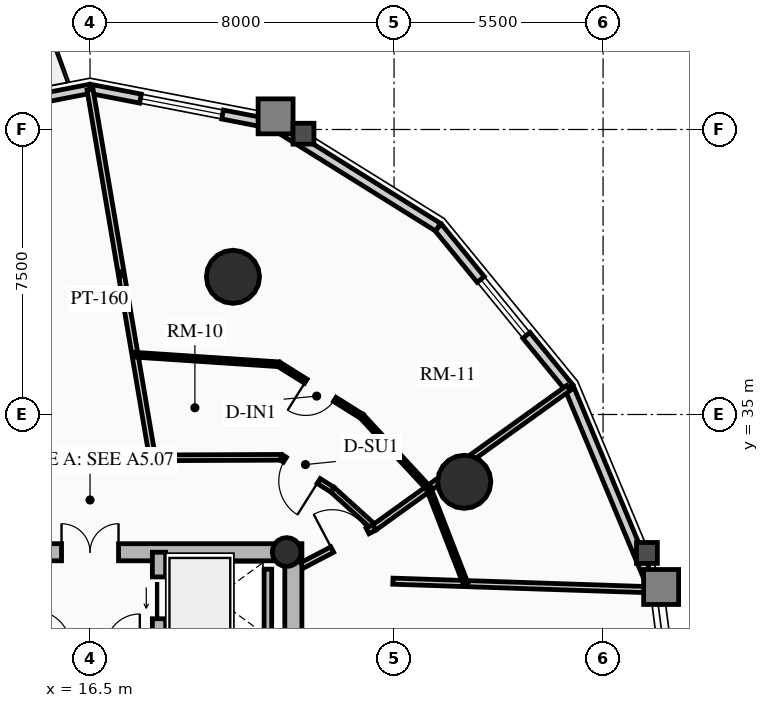
"""IFC4 building model, lengths in metres.
Left out: names, types, materials, properties, quantities, classifications, styles, units other than length and angle.
Written with IfcOpenShell. Run it as: python <this file> out.ifc"""

import sys

from ifc_helpers import new_model, si_unit, direction, frame, frame_2d, origin, origin_2d, place, context, subcontext, project, spatial, rectangle, circle, hollow_circle, extrude, source, transform, mapped, element, fill, save


model = new_model("IFC4")
c1 = context("Model", 3, precision=1e-05, world=origin(), true_north=direction((0.0, 1.0)))
c2 = subcontext(c1, "Body", "Model", "MODEL_VIEW")
j1 = project(units=[si_unit("LENGTHUNIT", "METRE"), si_unit("PLANEANGLEUNIT", "RADIAN")], contexts=[c1])
p1 = place(None, origin())
s1 = spatial("IfcSite", under=j1, at=p1, CompositionType="ELEMENT")
p2 = place(p1, origin())
s2 = spatial("IfcBuilding", under=s1, at=p2, CompositionType="ELEMENT")
p3 = place(p2, frame((0.0, 0.0, 110.89)))
s3 = spatial("IfcBuildingStorey", under=s2, at=p3, CompositionType="ELEMENT", Elevation=110.89)
p4 = place(p3, frame((21.85, 17.4, 0.0), z_axis=(0.0, 0.0, 1.0), x_axis=(0.0, 1.0, 0.0)))
e1 = element("IfcWall", 1, at=p4, inside=s3, PredefinedType="SHEAR", context=c2, shape_type="SweptSolid", body=[
    extrude(rectangle(XDim=14.2, YDim=0.45, at=frame_2d((7.1, 0.0))), origin(), (0.0, 0.0, 1.0), 2.91),
])
p5 = place(p3, frame((11.15, 31.375, 0.0), z_axis=(0.0, 0.0, 1.0), x_axis=(1.0, 0.0, 0.0)))
e2 = element("IfcWall", 2, at=p5, inside=s3, PredefinedType="SHEAR", context=c2, shape_type="SweptSolid", body=[
    extrude(rectangle(XDim=10.7, YDim=0.45, at=frame_2d((5.35, 0.0))), origin(), (0.0, 0.0, 1.0), 2.91),
])
m1 = source(origin(), c2, "Body", "SweptSolid", [
    extrude(rectangle(XDim=1.5, YDim=2.02, at=frame_2d((0.75, 1.01))), frame((0.0, 0.235, 0.0), z_axis=(0.0, -1.0, 0.0), x_axis=(1.0, 0.0, 0.0)), (0.0, 0.0, 1.0), 0.47),
])
p6 = place(p5, frame((4.6, 0.0, 0.0)))
e3 = element("IfcOpeningElement", 3, at=p6, cuts=e2, PredefinedType="OPENING", context=c2, shape_type="MappedRepresentation", body=[
    mapped(m1, transform((0.0, 0.0, 0.0), x_axis=(1.0, 0.0, 0.0), y_axis=(0.0, 1.0, 0.0), z_axis=(0.0, 0.0, 1.0), scale=1.0)),
])
p7 = place(p3, frame((18.315, 17.625, 0.0), z_axis=(0.0, 0.0, 1.0), x_axis=(0.0, 1.0, 0.0)))
e4 = element("IfcWall", 4, at=p7, inside=s3, PredefinedType="SHEAR", context=c2, shape_type="SweptSolid", body=[
    extrude(rectangle(XDim=13.75, YDim=0.35, at=frame_2d((6.875, 0.0))), origin(), (0.0, 0.0, 1.0), 2.91),
])
m2 = source(origin(), c2, "Body", "SweptSolid", [
    extrude(rectangle(XDim=1.1, YDim=2.015, at=frame_2d((0.55, 1.007))), frame((0.0, 0.185, 0.0), z_axis=(0.0, -1.0, 0.0), x_axis=(1.0, 0.0, 0.0)), (0.0, 0.0, 1.0), 0.37),
])
p8 = place(p7, frame((10.0, 0.0, 0.0)))
e5 = element("IfcOpeningElement", 5, at=p8, cuts=e4, PredefinedType="OPENING", context=c2, shape_type="MappedRepresentation", body=[
    mapped(m2, transform((0.0, 0.0, 0.0), x_axis=(1.0, 0.0, 0.0), y_axis=(0.0, 1.0, 0.0), z_axis=(0.0, 0.0, 1.0), scale=1.0)),
])
p9 = place(p7, frame((12.0, 0.0, 0.0)))
e6 = element("IfcOpeningElement", 6, at=p9, cuts=e4, PredefinedType="OPENING", context=c2, shape_type="MappedRepresentation", body=[
    mapped(m2, transform((0.0, 0.0, 0.0), x_axis=(1.0, 0.0, 0.0), y_axis=(0.0, 1.0, 0.0), z_axis=(0.0, 0.0, 1.0), scale=1.0)),
])
m3 = source(origin(), c2, "Body", "SweptSolid", [
    extrude(rectangle(XDim=1.15, YDim=2.02, at=frame_2d((0.575, 1.01))), frame((0.0, 0.185, 0.0), z_axis=(0.0, -1.0, 0.0), x_axis=(1.0, 0.0, 0.0)), (0.0, 0.0, 1.0), 0.37),
])
p10 = place(p7, frame((5.305, 0.0, 0.0)))
e7 = element("IfcOpeningElement", 7, at=p10, cuts=e4, PredefinedType="OPENING", context=c2, shape_type="MappedRepresentation", body=[
    mapped(m3, transform((0.0, 0.0, 0.0), x_axis=(1.0, 0.0, 0.0), y_axis=(0.0, 1.0, 0.0), z_axis=(0.0, 0.0, 1.0), scale=1.0)),
])
p11 = place(p3, frame((21.675, 31.38, 0.0), z_axis=(0.0, 0.0, 1.0), x_axis=(1.0, 0.0, 0.0)))
e8 = element("IfcColumn", 8, at=p11, inside=s3, PredefinedType="COLUMN", context=c2, shape_type="SweptSolid", body=[
    extrude(hollow_circle(Radius=0.38, WallThickness=0.032, at=origin_2d()), origin(), (0.0, 0.0, 1.0), 2.91),
])
for number, where, z_axis, x_axis in (
    (9, (26.347, 33.229, 0.0), (0.0, 0.0, 1.0), (1.0, 0.0, 0.0)),
    (10, (20.261, 38.623, 0.0), (0.0, 0.0, 1.0), (1.0, 0.0, 0.0)),
):
    element("IfcColumn", number, at=place(p3, frame(where, z_axis=z_axis, x_axis=x_axis)), inside=s3, PredefinedType="USERDEFINED", context=c2, shape_type="SweptSolid", body=[
        extrude(circle(Radius=0.7, at=origin_2d()), origin(), (0.0, 0.0, 1.0), 2.91),
    ])
p12 = place(p3, frame((29.105, 35.709, 0.0), z_axis=(0.0, 0.0, 1.0), x_axis=(0.384344417632, -0.923189779317, 0.0)))
e11 = element("IfcWall", 11, at=p12, inside=s3, PredefinedType="SOLIDWALL", context=c2, shape_type="SweptSolid", body=[
    extrude(rectangle(XDim=5.758, YDim=0.24, at=frame_2d((2.879, 0.0))), origin(), (0.0, 0.0, 1.0), 2.179),
])
p13 = place(p3, frame((25.658, 39.928, 0.0), z_axis=(0.0, 0.0, 1.0), x_axis=(0.632700781152, -0.77439635945, 0.0)))
e12 = element("IfcWall", 12, at=p13, inside=s3, PredefinedType="SOLIDWALL", context=c2, shape_type="SweptSolid", body=[
    extrude(rectangle(XDim=5.448, YDim=0.24, at=frame_2d((2.724, 0.0))), origin(), (0.0, 0.0, 1.0), 2.179),
])
m4 = source(origin(), c2, "Body", "SweptSolid", [
    extrude(rectangle(XDim=1.9, YDim=1.35, at=frame_2d((0.95, 0.675))), frame((0.0, 0.13, 0.0), z_axis=(0.0, -1.0, 0.0), x_axis=(1.0, 0.0, 0.0)), (0.0, 0.0, 1.0), 0.26),
])
p14 = place(p13, frame((1.774, 0.0, 0.65)))
e13 = element("IfcOpeningElement", 13, at=p14, cuts=e12, PredefinedType="OPENING", context=c2, shape_type="MappedRepresentation", body=[
    mapped(m4, transform((0.0, 0.0, 0.0), x_axis=(1.0, 0.0, 0.0), y_axis=(0.0, 1.0, 0.0), z_axis=(0.0, 0.0, 1.0), scale=1.0)),
])
p15 = place(p3, frame((21.315, 42.637, 0.0), z_axis=(0.0, 0.0, 1.0), x_axis=(0.848520380187, -0.529162701263, 0.0)))
e14 = element("IfcWall", 14, at=p15, inside=s3, PredefinedType="SOLIDWALL", context=c2, shape_type="SweptSolid", body=[
    extrude(rectangle(XDim=5.119, YDim=0.24, at=frame_2d((2.56, 0.0))), origin(), (0.0, 0.0, 1.0), 2.179),
])
p16 = place(p3, frame((16.5, 43.57, 0.0), z_axis=(0.0, 0.0, 1.0), x_axis=(0.981723785992, -0.190311344954, 0.0)))
e15 = element("IfcWall", 15, at=p16, inside=s3, PredefinedType="SOLIDWALL", context=c2, shape_type="SweptSolid", body=[
    extrude(rectangle(XDim=4.904, YDim=0.24, at=frame_2d((2.452, 0.0))), origin(), (0.0, 0.0, 1.0), 2.179),
])
m5 = source(origin(), c2, "Body", "SweptSolid", [
    extrude(rectangle(XDim=2.2, YDim=1.35, at=frame_2d((1.1, 0.675))), frame((0.0, 0.13, 0.0), z_axis=(0.0, -1.0, 0.0), x_axis=(1.0, 0.0, 0.0)), (0.0, 0.0, 1.0), 0.26),
])
p17 = place(p16, frame((1.352, 0.0, 0.65)))
e16 = element("IfcOpeningElement", 16, at=p17, cuts=e15, PredefinedType="OPENING", context=c2, shape_type="MappedRepresentation", body=[
    mapped(m5, transform((0.0, 0.0, 0.0), x_axis=(1.0, 0.0, 0.0), y_axis=(0.0, 1.0, 0.0), z_axis=(0.0, 0.0, 1.0), scale=1.0)),
])
p18 = place(p3, frame((11.685, 42.637, 0.0), z_axis=(0.0, 0.0, 1.0), x_axis=(0.981723785992, 0.190311344954, 0.0)))
e17 = element("IfcWall", 17, at=p18, inside=s3, PredefinedType="SOLIDWALL", context=c2, shape_type="SweptSolid", body=[
    extrude(rectangle(XDim=4.904, YDim=0.24, at=frame_2d((2.452, 0.0))), origin(), (0.0, 0.0, 1.0), 2.179),
])
m6 = source(origin(), c2, "Body", "SweptSolid", [
    extrude(rectangle(XDim=1.15, YDim=2.005, at=frame_2d((0.575, 1.002))), frame((0.0, 0.13, 0.0), z_axis=(0.0, -1.0, 0.0), x_axis=(1.0, 0.0, 0.0)), (0.0, 0.0, 1.0), 0.26),
])
p19 = place(p18, frame((1.877, 0.0, 0.0)))
e18 = element("IfcOpeningElement", 18, at=p19, cuts=e17, PredefinedType="OPENING", context=c2, shape_type="MappedRepresentation", body=[
    mapped(m6, transform((0.0, 0.0, 0.0), x_axis=(1.0, 0.0, 0.0), y_axis=(0.0, 1.0, 0.0), z_axis=(0.0, 0.0, 1.0), scale=1.0)),
])
p20 = place(p3, frame((21.18, 29.295, 0.0), z_axis=(0.0, 0.0, 1.0), x_axis=(0.0, 1.0, 0.0)))
e19 = element("IfcWall", 19, at=p20, inside=s3, PredefinedType="SHEAR", context=c2, shape_type="SweptSolid", body=[
    extrude(rectangle(XDim=1.635, YDim=0.2, at=frame_2d((0.817, 0.0))), origin(), (0.0, 0.0, 1.0), 2.91),
])
p21 = place(p3, frame((23.98, 32.027, 0.0), z_axis=(0.0, 0.0, 1.0), x_axis=(-0.742353224332, 0.670008724065, 0.0)))
e20 = element("IfcWall", 20, at=p21, inside=s3, PredefinedType="PARTITIONING", context=c2, shape_type="SweptSolid", body=[
    extrude(rectangle(XDim=1.485, YDim=0.15, at=frame_2d((0.742, 0.0))), origin(), (0.0, 0.0, 1.0), 2.225),
])
p22 = place(p3, frame((22.877, 33.022, 0.0), z_axis=(0.0, 0.0, 1.0), x_axis=(-0.845895608855, 0.533348496689, 0.0)))
e21 = element("IfcWall", 21, at=p22, inside=s3, PredefinedType="PARTITIONING", context=c2, shape_type="SweptSolid", body=[
    extrude(rectangle(XDim=1.597, YDim=0.15, at=frame_2d((0.798, 0.0))), origin(), (0.0, 0.0, 1.0), 2.225),
])
m7 = source(origin(), c2, "Body", "SweptSolid", [
    extrude(rectangle(XDim=1.05, YDim=2.015, at=frame_2d((0.525, 1.007))), frame((0.0, 0.085, 0.0), z_axis=(0.0, -1.0, 0.0), x_axis=(1.0, 0.0, 0.0)), (0.0, 0.0, 1.0), 0.17),
])
p23 = place(p22, frame((0.427, 0.0, 0.0)))
e22 = element("IfcOpeningElement", 22, at=p23, cuts=e21, PredefinedType="OPENING", context=c2, shape_type="MappedRepresentation", body=[
    mapped(m7, transform((0.0, 0.0, 0.0), x_axis=(1.0, 0.0, 0.0), y_axis=(0.0, 1.0, 0.0), z_axis=(0.0, 0.0, 1.0), scale=1.0)),
])
p24 = place(p3, frame((21.527, 33.873, 0.0), z_axis=(0.0, 0.0, 1.0), x_axis=(-0.999991838845, -0.004040079574, 0.0)))
e23 = element("IfcWall", 23, at=p24, inside=s3, PredefinedType="PARTITIONING", context=c2, shape_type="SweptSolid", body=[
    extrude(rectangle(XDim=3.384, YDim=0.15, at=frame_2d((1.692, 0.0))), origin(), (0.0, 0.0, 1.0), 2.225),
])
p25 = place(p3, frame((18.143, 33.86, 0.0), z_axis=(0.0, 0.0, 1.0), x_axis=(-0.999419208319, -0.034077060363, 0.0)))
e24 = element("IfcWall", 24, at=p25, inside=s3, PredefinedType="PARTITIONING", context=c2, shape_type="SweptSolid", body=[
    extrude(rectangle(XDim=6.527, YDim=0.15, at=frame_2d((3.263, 0.0))), origin(), (0.0, 0.0, 1.0), 2.225),
])
p26 = place(p3, frame((24.469, 30.614, 0.0), z_axis=(0.0, 0.0, 1.0), x_axis=(0.999446768925, -0.033258924898, 0.0)))
e25 = element("IfcWall", 25, at=p26, inside=s3, PredefinedType="PARTITIONING", context=c2, shape_type="SweptSolid", body=[
    extrude(rectangle(XDim=6.834, YDim=0.16, at=frame_2d((3.417, 0.0))), origin(), (0.0, 0.0, 1.0), 2.179),
])
p27 = place(p3, frame((23.98, 32.027, 0.0), z_axis=(0.0, 0.0, 1.0), x_axis=(0.812162479031, 0.58343132214, 0.0)))
e26 = element("IfcWall", 26, at=p27, inside=s3, PredefinedType="PARTITIONING", context=c2, shape_type="SweptSolid", body=[
    extrude(rectangle(XDim=6.291, YDim=0.16, at=frame_2d((3.146, 0.0))), origin(), (0.0, 0.0, 1.0), 2.179),
])
p28 = place(p3, frame((18.143, 33.86, 0.0), z_axis=(0.0, 0.0, 1.0), x_axis=(-0.167145472003, 0.985932244725, 0.0)))
e27 = element("IfcWall", 27, at=p28, inside=s3, PredefinedType="PARTITIONING", context=c2, shape_type="SweptSolid", body=[
    extrude(rectangle(XDim=9.829, YDim=0.16, at=frame_2d((4.914, 0.0))), origin(), (0.0, 0.0, 1.0), 2.179),
])
p29 = place(p3, frame((22.075, 31.025, 0.0), z_axis=(0.0, 0.0, 1.0), x_axis=(0.885026466958, 0.465540710125, 0.0)))
e28 = element("IfcWall", 28, at=p29, inside=s3, PredefinedType="PARTITIONING", context=c2, shape_type="SweptSolid", body=[
    extrude(rectangle(XDim=2.152, YDim=0.16, at=frame_2d((1.076, 0.0))), origin(), (0.0, 0.0, 1.0), 2.225),
])
m8 = source(origin(), c2, "Body", "SweptSolid", [
    extrude(rectangle(XDim=1.05, YDim=2.015, at=frame_2d((0.525, 1.007))), frame((0.0, 0.09, 0.0), z_axis=(0.0, -1.0, 0.0), x_axis=(1.0, 0.0, 0.0)), (0.0, 0.0, 1.0), 0.18),
])
p30 = place(p29, frame((0.902, 0.0, 0.0)))
e29 = element("IfcOpeningElement", 29, at=p30, cuts=e28, PredefinedType="OPENING", context=c2, shape_type="MappedRepresentation", body=[
    mapped(m8, transform((0.0, 0.0, 0.0), x_axis=(1.0, 0.0, 0.0), y_axis=(0.0, 1.0, 0.0), z_axis=(0.0, 0.0, 1.0), scale=1.0)),
])
p31 = place(p3, frame((26.382, 30.551, 0.0), z_axis=(0.0, 0.0, 1.0), x_axis=(-0.361621391028, 0.932325034283, 0.0)))
e30 = element("IfcWall", 30, at=p31, inside=s3, PredefinedType="PARTITIONING", context=c2, shape_type="SweptSolid", body=[
    extrude(rectangle(XDim=2.686, YDim=0.125, at=frame_2d((1.343, 0.0))), origin(), (0.0, 0.0, 1.0), 2.225),
])
p32 = place(p3, frame((25.41, 33.054, 0.0), z_axis=(0.0, 0.0, 1.0), x_axis=(-0.679733694606, 0.73345899982, 0.0)))
e31 = element("IfcWall", 31, at=p32, inside=s3, PredefinedType="PARTITIONING", context=c2, shape_type="SweptSolid", body=[
    extrude(rectangle(XDim=2.586, YDim=0.125, at=frame_2d((1.293, 0.0))), origin(), (0.0, 0.0, 1.0), 2.655),
])
p33 = place(p3, frame((23.653, 34.951, 0.0), z_axis=(0.0, 0.0, 1.0), x_axis=(-0.847306782665, 0.531103771452, 0.0)))
e32 = element("IfcWall", 32, at=p33, inside=s3, PredefinedType="PARTITIONING", context=c2, shape_type="SweptSolid", body=[
    extrude(rectangle(XDim=2.581, YDim=0.125, at=frame_2d((1.291, 0.0))), origin(), (0.0, 0.0, 1.0), 2.225),
])
m9 = source(origin(), c2, "Body", "SweptSolid", [
    extrude(rectangle(XDim=0.9, YDim=2.005, at=frame_2d((0.45, 1.002))), frame((0.0, 0.073, 0.0), z_axis=(0.0, -1.0, 0.0), x_axis=(1.0, 0.0, 0.0)), (0.0, 0.0, 1.0), 0.145),
])
p34 = place(p33, frame((0.841, 0.0, 0.0)))
e33 = element("IfcOpeningElement", 33, at=p34, cuts=e32, PredefinedType="OPENING", context=c2, shape_type="MappedRepresentation", body=[
    mapped(m9, transform((0.0, 0.0, 0.0), x_axis=(1.0, 0.0, 0.0), y_axis=(0.0, 1.0, 0.0), z_axis=(0.0, 0.0, 1.0), scale=1.0)),
])
p35 = place(p3, frame((21.466, 36.322, 0.0), z_axis=(0.0, 0.0, 1.0), x_axis=(-0.997806476515, 0.066198454847, 0.0)))
e34 = element("IfcWall", 34, at=p35, inside=s3, PredefinedType="PARTITIONING", context=c2, shape_type="SweptSolid", body=[
    extrude(rectangle(XDim=3.791, YDim=0.125, at=frame_2d((1.896, 0.0))), origin(), (0.0, 0.0, 1.0), 2.225),
])
m10 = source(origin(), c2, "Body", "SweptSolid", [
    extrude(rectangle(XDim=1.9, YDim=1.35, at=frame_2d((0.95, 0.675))), frame((0.0, 0.03, 0.0), z_axis=(0.0, -1.0, 0.0), x_axis=(1.0, 0.0, 0.0)), (0.0, 0.0, 1.0), 0.06),
])
p36 = place(p14, origin())
e35 = element("IfcWindow", 35, at=p36, inside=s3, PartitioningType="DOUBLE_PANEL_VERTICAL", PredefinedType="WINDOW", context=c2, shape_type="MappedRepresentation", body=[
    mapped(m10, transform((0.0, 0.0, 0.0), x_axis=(1.0, 0.0, 0.0), y_axis=(0.0, 1.0, 0.0), z_axis=(0.0, 0.0, 1.0), scale=1.0)),
])
fill(e13, e35)
m11 = source(origin(), c2, "Body", "SweptSolid", [
    extrude(rectangle(XDim=2.2, YDim=1.35, at=frame_2d((1.1, 0.675))), frame((0.0, 0.03, 0.0), z_axis=(0.0, -1.0, 0.0), x_axis=(1.0, 0.0, 0.0)), (0.0, 0.0, 1.0), 0.06),
])
p37 = place(p17, origin())
e36 = element("IfcWindow", 36, at=p37, inside=s3, PartitioningType="DOUBLE_PANEL_VERTICAL", PredefinedType="WINDOW", context=c2, shape_type="MappedRepresentation", body=[
    mapped(m11, transform((0.0, 0.0, 0.0), x_axis=(1.0, 0.0, 0.0), y_axis=(0.0, 1.0, 0.0), z_axis=(0.0, 0.0, 1.0), scale=1.0)),
])
fill(e16, e36)
m12 = source(origin(), c2, "Body", "SweptSolid", [
    extrude(rectangle(XDim=1.1, YDim=2.015, at=frame_2d((0.55, 1.007))), frame((0.0, 0.025, 0.0), z_axis=(0.0, -1.0, 0.0), x_axis=(1.0, 0.0, 0.0)), (0.0, 0.0, 1.0), 0.05),
])
p38 = place(p9, origin())
e37 = element("IfcDoor", 37, at=p38, inside=s3, OperationType="SLIDING_TO_LEFT", PredefinedType="DOOR", context=c2, shape_type="MappedRepresentation", body=[
    mapped(m12, transform((0.0, 0.0, 0.0), x_axis=(1.0, 0.0, 0.0), y_axis=(0.0, 1.0, 0.0), z_axis=(0.0, 0.0, 1.0), scale=1.0)),
])
fill(e6, e37)
m13 = source(origin(), c2, "Body", "SweptSolid", [
    extrude(rectangle(XDim=1.5, YDim=2.02, at=frame_2d((0.75, 1.01))), frame((0.0, 0.025, 0.0), z_axis=(0.0, -1.0, 0.0), x_axis=(1.0, 0.0, 0.0)), (0.0, 0.0, 1.0), 0.05),
])
p39 = place(p6, origin())
e38 = element("IfcDoor", 38, at=p39, inside=s3, OperationType="DOUBLE_DOOR_SINGLE_SWING", PredefinedType="DOOR", context=c2, shape_type="MappedRepresentation", body=[
    mapped(m13, transform((0.0, 0.0, 0.0), x_axis=(1.0, 0.0, 0.0), y_axis=(0.0, 1.0, 0.0), z_axis=(0.0, 0.0, 1.0), scale=1.0)),
])
fill(e3, e38)
m14 = source(origin(), c2, "Body", "SweptSolid", [
    extrude(rectangle(XDim=1.05, YDim=2.015, at=frame_2d((0.525, 1.007))), frame((0.0, 0.025, 0.0), z_axis=(0.0, -1.0, 0.0), x_axis=(1.0, 0.0, 0.0)), (0.0, 0.0, 1.0), 0.05),
])
p40 = place(p30, origin())
e39 = element("IfcDoor", 39, at=p40, inside=s3, OperationType="SINGLE_SWING_LEFT", PredefinedType="DOOR", context=c2, shape_type="MappedRepresentation", body=[
    mapped(m14, transform((0.0, 0.0, 0.0), x_axis=(1.0, 0.0, 0.0), y_axis=(0.0, 1.0, 0.0), z_axis=(0.0, 0.0, 1.0), scale=1.0)),
])
fill(e29, e39)
p41 = place(p23, origin())
e40 = element("IfcDoor", 40, at=p41, inside=s3, OperationType="SINGLE_SWING_LEFT", PredefinedType="DOOR", context=c2, shape_type="MappedRepresentation", body=[
    mapped(m14, transform((0.0, 0.0, 0.0), x_axis=(1.0, 0.0, 0.0), y_axis=(0.0, 1.0, 0.0), z_axis=(0.0, 0.0, 1.0), scale=1.0)),
])
fill(e22, e40)
m15 = source(origin(), c2, "Body", "SweptSolid", [
    extrude(rectangle(XDim=0.9, YDim=2.005, at=frame_2d((0.45, 1.002))), frame((0.0, 0.025, 0.0), z_axis=(0.0, -1.0, 0.0), x_axis=(1.0, 0.0, 0.0)), (0.0, 0.0, 1.0), 0.05),
])
p42 = place(p34, origin())
e41 = element("IfcDoor", 41, at=p42, inside=s3, OperationType="SINGLE_SWING_RIGHT", PredefinedType="DOOR", context=c2, shape_type="MappedRepresentation", body=[
    mapped(m15, transform((0.0, 0.0, 0.0), x_axis=(1.0, 0.0, 0.0), y_axis=(0.0, 1.0, 0.0), z_axis=(0.0, 0.0, 1.0), scale=1.0)),
])
fill(e33, e41)
save(model, sys.argv[1])
